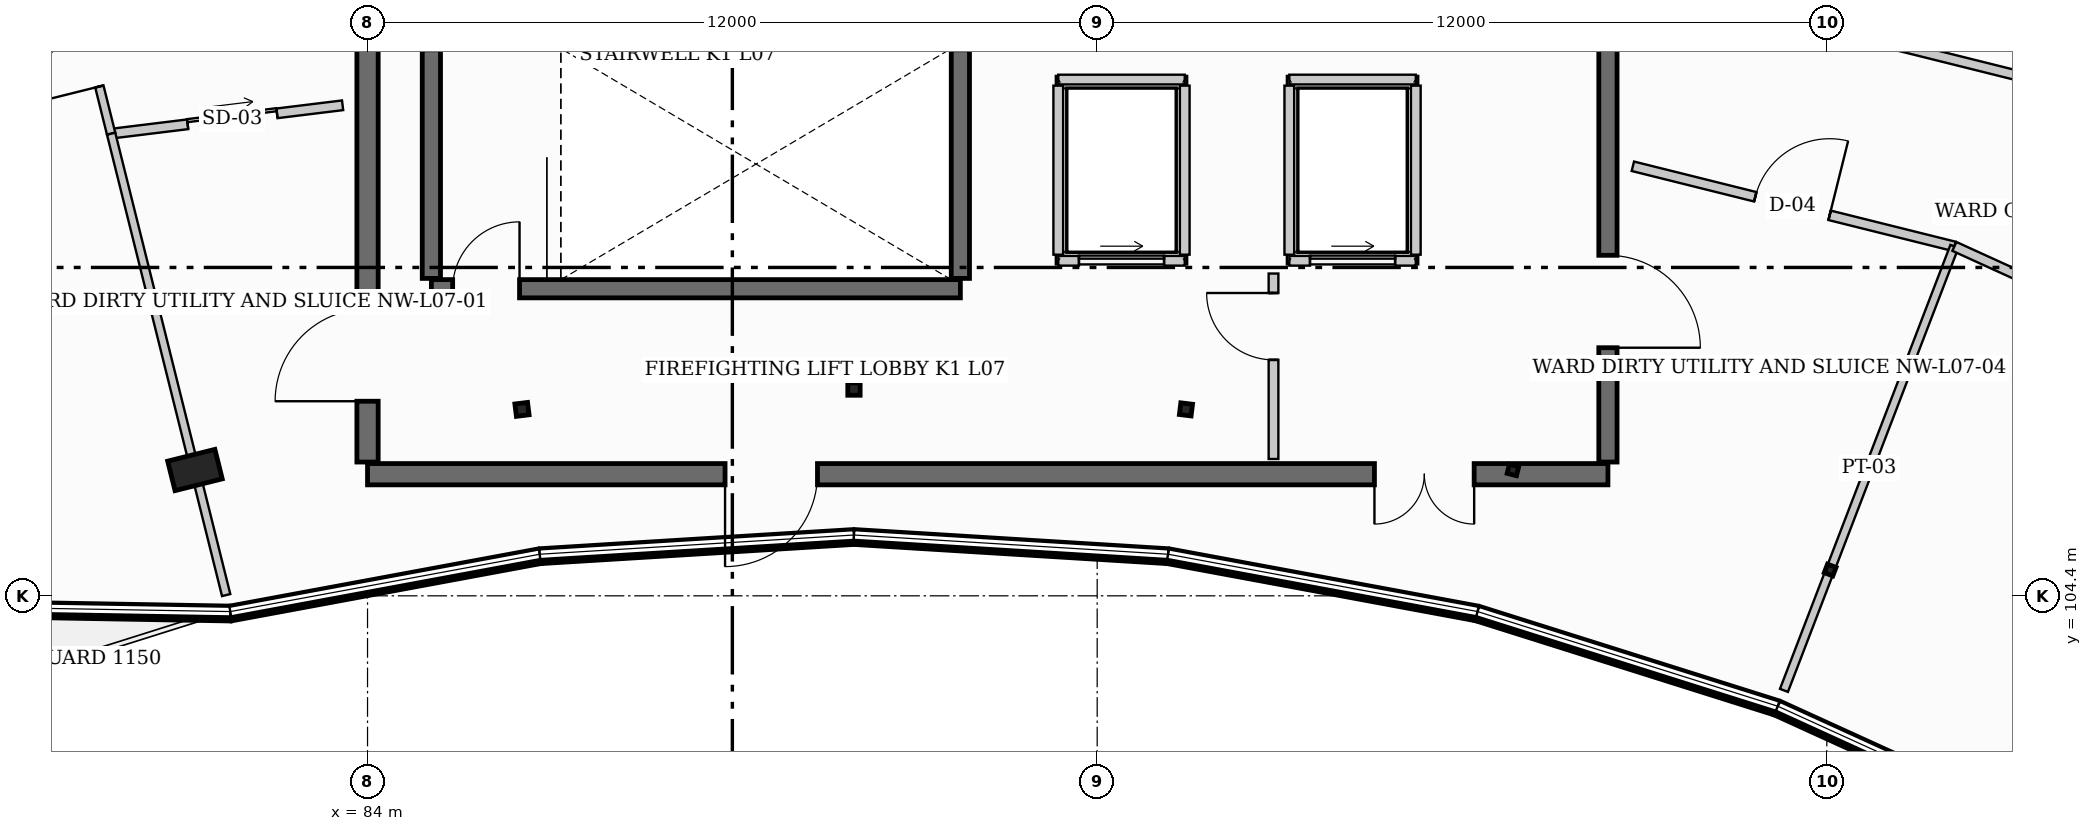
"""IFC4 building model, lengths in metres.
Left out: names, types, materials, properties, quantities, classifications, styles, units other than length and angle.
Written with IfcOpenShell. Run it as: python <this file> out.ifc"""

import sys

from ifc_helpers import new_model, si_unit, direction, frame, frame_2d, origin, origin_2d, place, context, subcontext, project, spatial, rectangle, hollow_rectangle, hollow_circle, i_section, extrude, element, fill, save


model = new_model("IFC4")
c1 = context("Model", 3, precision=1e-05, world=origin(), true_north=direction((0.0, 1.0)))
c2 = subcontext(c1, "Body", "Model", "MODEL_VIEW")
j1 = project(units=[si_unit("LENGTHUNIT", "METRE"), si_unit("PLANEANGLEUNIT", "RADIAN")], contexts=[c1])
p1 = place(None, origin())
s1 = spatial("IfcSite", under=j1, at=p1, CompositionType="ELEMENT")
p2 = place(p1, origin())
s2 = spatial("IfcBuilding", under=s1, at=p2, CompositionType="ELEMENT")
p3 = place(p2, frame((0.0, 0.0, 30.0)))
s3 = spatial("IfcBuildingStorey", under=s2, at=p3, CompositionType="ELEMENT", Elevation=30.0)
p4 = place(p3, frame((81.162, 106.469, 0.0), z_axis=(0.0, 0.0, 1.0), x_axis=(-0.2419218956, 0.970295726276, 0.0)))
e1 = element("IfcColumn", 1, at=p4, inside=s3, PredefinedType="PILASTER", context=c2, shape_type="SweptSolid", body=[
    extrude(rectangle(XDim=0.5, YDim=0.8, at=origin_2d()), origin(), (0.0, 0.0, 1.0), 3.9),
])
p5 = place(p3, frame((86.54, 107.466, 0.0), z_axis=(0.0, 0.0, 1.0), x_axis=(-0.121869343405, 0.992546151641, 0.0)))
e2 = element("IfcColumn", 2, at=p5, inside=s3, PredefinedType="COLUMN", context=c2, shape_type="SweptSolid", body=[
    extrude(i_section(OverallWidth=0.205, OverallDepth=0.21, WebThickness=0.009, FlangeThickness=0.014, at=origin_2d()), origin(), (0.0, 0.0, 1.0), 3.9),
])
p6 = place(p3, frame((92.0, 107.8, 0.0), z_axis=(0.0, 0.0, 1.0), x_axis=(0.0, 1.0, 0.0)))
e3 = element("IfcColumn", 3, at=p6, inside=s3, PredefinedType="COLUMN", context=c2, shape_type="SweptSolid", body=[
    extrude(i_section(OverallWidth=0.203, OverallDepth=0.203, WebThickness=0.007, FlangeThickness=0.011, at=origin_2d()), origin(), (0.0, 0.0, 1.0), 3.9),
])
p7 = place(p3, frame((97.46, 107.466, 0.0), z_axis=(0.0, 0.0, 1.0), x_axis=(0.121869343405, 0.992546151641, 0.0)))
e4 = element("IfcColumn", 4, at=p7, inside=s3, PredefinedType="COLUMN", context=c2, shape_type="SweptSolid", body=[
    extrude(hollow_circle(Radius=0.097, WallThickness=0.008, at=origin_2d()), origin(), (0.0, 0.0, 1.0), 3.9),
])
p8 = place(p3, frame((102.838, 106.469, 0.0), z_axis=(0.0, 0.0, 1.0), x_axis=(0.2419218956, 0.970295726276, 0.0)))
e5 = element("IfcColumn", 5, at=p8, inside=s3, PredefinedType="COLUMN", context=c2, shape_type="SweptSolid", body=[
    extrude(i_section(OverallWidth=0.153, OverallDepth=0.158, WebThickness=0.007, FlangeThickness=0.01, at=origin_2d()), origin(), (0.0, 0.0, 1.0), 3.9),
])
p9 = place(p3, frame((108.055, 104.824, 0.0), z_axis=(0.0, 0.0, 1.0), x_axis=(0.358367949545, 0.933580426497, 0.0)))
e6 = element("IfcColumn", 6, at=p9, inside=s3, PredefinedType="COLUMN", context=c2, shape_type="SweptSolid", body=[
    extrude(hollow_rectangle(XDim=0.15, YDim=0.15, WallThickness=0.008, at=origin_2d()), origin(), (0.0, 0.0, 1.0), 3.9),
])
p10 = place(p3, frame((104.4, 106.4, 0.0), z_axis=(0.0, 0.0, 1.0), x_axis=(-1.0, 0.0, 0.0)))
e7 = element("IfcWall", 7, at=p10, inside=s3, PredefinedType="SHEAR", context=c2, shape_type="SweptSolid", body=[
    extrude(rectangle(XDim=20.4, YDim=0.35, at=frame_2d((10.2, 0.0))), origin(), (0.0, 0.0, 1.0), 3.9),
])
p11 = place(p10, frame((2.2, 0.0, 0.0)))
e8 = element("IfcOpeningElement", 8, at=p11, cuts=e7, PredefinedType="OPENING", context=c2, shape_type="SweptSolid", body=[
    extrude(rectangle(XDim=1.64, YDim=2.2, at=frame_2d((0.82, 1.1))), frame((0.0, 0.185, 0.0), z_axis=(0.0, -1.0, 0.0), x_axis=(1.0, 0.0, 0.0)), (0.0, 0.0, 1.0), 0.37),
])
p12 = place(p10, frame((13.0, 0.0, 0.0)))
e9 = element("IfcOpeningElement", 9, at=p12, cuts=e7, PredefinedType="OPENING", context=c2, shape_type="SweptSolid", body=[
    extrude(rectangle(XDim=1.52, YDim=2.16, at=frame_2d((0.76, 1.08))), frame((0.0, 0.185, 0.0), z_axis=(0.0, -1.0, 0.0), x_axis=(1.0, 0.0, 0.0)), (0.0, 0.0, 1.0), 0.37),
])
p13 = place(p3, frame((84.0, 106.6, 0.0), z_axis=(0.0, 0.0, 1.0), x_axis=(0.0, 1.0, 0.0)))
e10 = element("IfcWall", 10, at=p13, inside=s3, PredefinedType="SHEAR", context=c2, shape_type="SweptSolid", body=[
    extrude(rectangle(XDim=10.6, YDim=0.35, at=frame_2d((5.3, 0.0))), origin(), (0.0, 0.0, 1.0), 3.9),
])
p14 = place(p13, frame((1.0, 0.0, 0.0)))
e11 = element("IfcOpeningElement", 11, at=p14, cuts=e10, PredefinedType="OPENING", context=c2, shape_type="SweptSolid", body=[
    extrude(rectangle(XDim=1.52, YDim=2.16, at=frame_2d((0.76, 1.08))), frame((0.0, 0.185, 0.0), z_axis=(0.0, -1.0, 0.0), x_axis=(1.0, 0.0, 0.0)), (0.0, 0.0, 1.0), 0.37),
])
p15 = place(p3, frame((104.4, 117.2, 0.0), z_axis=(0.0, 0.0, 1.0), x_axis=(0.0, -1.0, 0.0)))
e12 = element("IfcWall", 12, at=p15, inside=s3, PredefinedType="SHEAR", context=c2, shape_type="SweptSolid", body=[
    extrude(rectangle(XDim=10.6, YDim=0.3, at=frame_2d((5.3, 0.0))), origin(), (0.0, 0.0, 1.0), 3.9),
])
p16 = place(p15, frame((7.2, 0.0, 0.0)))
e13 = element("IfcOpeningElement", 13, at=p16, cuts=e12, PredefinedType="OPENING", context=c2, shape_type="SweptSolid", body=[
    extrude(rectangle(XDim=1.52, YDim=2.16, at=frame_2d((0.76, 1.08))), frame((0.0, 0.16, 0.0), z_axis=(0.0, -1.0, 0.0), x_axis=(1.0, 0.0, 0.0)), (0.0, 0.0, 1.0), 0.32),
])
p17 = place(p3, frame((85.05, 109.45, 0.0), z_axis=(0.0, 0.0, 1.0), x_axis=(1.0, 0.0, 0.0)))
e14 = element("IfcWall", 14, at=p17, inside=s3, PredefinedType="SHEAR", context=c2, shape_type="SweptSolid", body=[
    extrude(rectangle(XDim=8.7, YDim=0.3, at=frame_2d((4.35, 0.0))), origin(), (0.0, 0.0, 1.0), 3.9),
])
p18 = place(p17, frame((0.35, 0.0, 0.0)))
e15 = element("IfcOpeningElement", 15, at=p18, cuts=e14, PredefinedType="OPENING", context=c2, shape_type="SweptSolid", body=[
    extrude(rectangle(XDim=1.1, YDim=2.15, at=frame_2d((0.55, 1.075))), frame((0.0, 0.16, 0.0), z_axis=(0.0, -1.0, 0.0), x_axis=(1.0, 0.0, 0.0)), (0.0, 0.0, 1.0), 0.32),
])
for number, where, z_axis, x_axis in (
    (16, (85.05, 109.62, 0.0), (0.0, 0.0, 1.0), (0.0, 1.0, 0.0)),
    (17, (93.75, 109.62, 0.0), (0.0, 0.0, 1.0), (0.0, 1.0, 0.0)),
):
    element("IfcWall", number, at=place(p3, frame(where, z_axis=z_axis, x_axis=x_axis)), inside=s3, PredefinedType="SHEAR", context=c2, shape_type="SweptSolid", body=[
        extrude(rectangle(XDim=3.76, YDim=0.3, at=frame_2d((1.88, 0.0))), origin(), (0.0, 0.0, 1.0), 3.9),
    ])
p19 = place(p3, frame((81.743, 104.141, 0.0), z_axis=(0.0, 0.0, 1.0), x_axis=(-0.999850479392, 0.017292161782, 0.0)))
e18 = element("IfcWall", 18, at=p19, inside=s3, PredefinedType="STANDARD", context=c2, shape_type="SweptSolid", body=[
    extrude(rectangle(XDim=4.97, YDim=0.22, at=frame_2d((2.485, 0.0))), origin(), (0.0, 0.0, 1.0), 1.05),
])
for number, where, z_axis, x_axis in (
    (19, (86.833, 105.084, 0.0), (0.0, 0.0, 1.0), (-0.983, -0.182, 0.0)),
    (20, (92.0, 105.4, 0.0), (0.0, 0.0, 1.0), (-0.998, -0.061, 0.0)),
    (21, (97.167, 105.084, 0.0), (0.0, 0.0, 1.0), (-0.998, 0.061, 0.0)),
    (22, (102.257, 104.141, 0.0), (0.0, 0.0, 1.0), (-0.983, 0.182, 0.0)),
):
    element("IfcWall", number, at=place(p3, frame(where, z_axis=z_axis, x_axis=x_axis)), inside=s3, PredefinedType="STANDARD", context=c2, shape_type="SweptSolid", body=[
        extrude(rectangle(XDim=5.177, YDim=0.22, at=frame_2d((2.588, 0.0))), origin(), (0.0, 0.0, 1.0), 1.05),
    ])
p20 = place(p3, frame((107.195, 102.584, 0.0), z_axis=(0.0, 0.0, 1.0), x_axis=(-0.953706582316, 0.300738681994, 0.0)))
e23 = element("IfcWall", 23, at=p20, inside=s3, PredefinedType="STANDARD", context=c2, shape_type="SweptSolid", body=[
    extrude(rectangle(XDim=5.178, YDim=0.22, at=frame_2d((2.589, 0.0))), origin(), (0.0, 0.0, 1.0), 1.05),
])
p21 = place(p3, frame((111.906, 100.437, 0.0), z_axis=(0.0, 0.0, 1.0), x_axis=(-0.909955822384, 0.414705198074, 0.0)))
e24 = element("IfcWall", 24, at=p21, inside=s3, PredefinedType="STANDARD", context=c2, shape_type="SweptSolid", body=[
    extrude(rectangle(XDim=5.177, YDim=0.22, at=frame_2d((2.588, 0.0))), origin(), (0.0, 0.0, 1.0), 1.05),
])
p22 = place(p3, frame((95.36, 109.91, 0.0), z_axis=(0.0, 0.0, 1.0), x_axis=(1.0, 0.0, 0.0)))
e25 = element("IfcWall", 25, at=p22, inside=s3, PredefinedType="PARTITIONING", context=c2, shape_type="SweptSolid", body=[
    extrude(rectangle(XDim=2.08, YDim=0.16, at=frame_2d((1.04, 0.0))), origin(), (0.0, 0.0, 1.0), 3.57),
])
p23 = place(p22, frame((0.34, 0.0, 0.0)))
e26 = element("IfcOpeningElement", 26, at=p23, cuts=e25, PredefinedType="OPENING", context=c2, shape_type="SweptSolid", body=[
    extrude(rectangle(XDim=1.4, YDim=2.2, at=frame_2d((0.7, 1.1))), frame((0.0, 0.09, 0.0), z_axis=(0.0, -1.0, 0.0), x_axis=(1.0, 0.0, 0.0)), (0.0, 0.0, 1.0), 0.18),
])
p24 = place(p3, frame((97.44, 112.89, 0.0), z_axis=(0.0, 0.0, 1.0), x_axis=(-1.0, 0.0, 0.0)))
e27 = element("IfcWall", 27, at=p24, inside=s3, PredefinedType="PARTITIONING", context=c2, shape_type="SweptSolid", body=[
    extrude(rectangle(XDim=2.08, YDim=0.16, at=frame_2d((1.04, 0.0))), origin(), (0.0, 0.0, 1.0), 3.57),
])
for number, where, z_axis, x_axis in (
    (28, (95.36, 112.79, 0.0), (0.0, 0.0, 1.0), (0.0, -1.0, 0.0)),
    (29, (97.44, 110.01, 0.0), (0.0, 0.0, 1.0), (0.0, 1.0, 0.0)),
):
    element("IfcWall", number, at=place(p3, frame(where, z_axis=z_axis, x_axis=x_axis)), inside=s3, PredefinedType="PARTITIONING", context=c2, shape_type="SweptSolid", body=[
        extrude(rectangle(XDim=2.78, YDim=0.16, at=frame_2d((1.39, 0.0))), origin(), (0.0, 0.0, 1.0), 3.57),
    ])
p25 = place(p3, frame((99.16, 109.91, 0.0), z_axis=(0.0, 0.0, 1.0), x_axis=(1.0, 0.0, 0.0)))
e30 = element("IfcWall", 30, at=p25, inside=s3, PredefinedType="PARTITIONING", context=c2, shape_type="SweptSolid", body=[
    extrude(rectangle(XDim=2.08, YDim=0.16, at=frame_2d((1.04, 0.0))), origin(), (0.0, 0.0, 1.0), 3.57),
])
p26 = place(p25, frame((0.34, 0.0, 0.0)))
e31 = element("IfcOpeningElement", 31, at=p26, cuts=e30, PredefinedType="OPENING", context=c2, shape_type="SweptSolid", body=[
    extrude(rectangle(XDim=1.4, YDim=2.2, at=frame_2d((0.7, 1.1))), frame((0.0, 0.09, 0.0), z_axis=(0.0, -1.0, 0.0), x_axis=(1.0, 0.0, 0.0)), (0.0, 0.0, 1.0), 0.18),
])
p27 = place(p3, frame((101.24, 112.89, 0.0), z_axis=(0.0, 0.0, 1.0), x_axis=(-1.0, 0.0, 0.0)))
e32 = element("IfcWall", 32, at=p27, inside=s3, PredefinedType="PARTITIONING", context=c2, shape_type="SweptSolid", body=[
    extrude(rectangle(XDim=2.08, YDim=0.16, at=frame_2d((1.04, 0.0))), origin(), (0.0, 0.0, 1.0), 3.57),
])
for number, where, z_axis, x_axis in (
    (33, (99.16, 112.79, 0.0), (0.0, 0.0, 1.0), (0.0, -1.0, 0.0)),
    (34, (101.24, 110.01, 0.0), (0.0, 0.0, 1.0), (0.0, 1.0, 0.0)),
):
    element("IfcWall", number, at=place(p3, frame(where, z_axis=z_axis, x_axis=x_axis)), inside=s3, PredefinedType="PARTITIONING", context=c2, shape_type="SweptSolid", body=[
        extrude(rectangle(XDim=2.78, YDim=0.16, at=frame_2d((1.39, 0.0))), origin(), (0.0, 0.0, 1.0), 3.57),
    ])
p28 = place(p3, frame((98.9, 106.65, 0.0), z_axis=(0.0, 0.0, 1.0), x_axis=(0.0, 1.0, 0.0)))
e35 = element("IfcWall", 35, at=p28, inside=s3, PredefinedType="PARTITIONING", context=c2, shape_type="SweptSolid", body=[
    extrude(rectangle(XDim=3.05, YDim=0.16, at=frame_2d((1.525, 0.0))), origin(), (0.0, 0.0, 1.0), 3.57),
])
p29 = place(p28, frame((1.63, 0.0, 0.0)))
e36 = element("IfcOpeningElement", 36, at=p29, cuts=e35, PredefinedType="OPENING", context=c2, shape_type="SweptSolid", body=[
    extrude(rectangle(XDim=1.1, YDim=2.15, at=frame_2d((0.55, 1.075))), frame((0.0, 0.09, 0.0), z_axis=(0.0, -1.0, 0.0), x_axis=(1.0, 0.0, 0.0)), (0.0, 0.0, 1.0), 0.18),
])
p30 = place(p3, frame((79.783, 112.0, 0.0), z_axis=(0.0, 0.0, 1.0), x_axis=(0.992559253302, 0.121762591482, 0.0)))
e37 = element("IfcWall", 37, at=p30, inside=s3, PredefinedType="PARTITIONING", context=c2, shape_type="SweptSolid", body=[
    extrude(rectangle(XDim=3.836, YDim=0.16, at=frame_2d((1.918, 0.0))), origin(), (0.0, 0.0, 1.0), 3.278),
])
p31 = place(p30, frame((1.268, 0.0, 0.0)))
e38 = element("IfcOpeningElement", 38, at=p31, cuts=e37, PredefinedType="OPENING", context=c2, shape_type="SweptSolid", body=[
    extrude(rectangle(XDim=1.48, YDim=2.26, at=frame_2d((0.74, 1.13))), frame((0.0, 0.09, 0.0), z_axis=(0.0, -1.0, 0.0), x_axis=(1.0, 0.0, 0.0)), (0.0, 0.0, 1.0), 0.18),
])
p32 = place(p3, frame((104.81, 114.533, 0.0), z_axis=(0.0, 0.0, 1.0), x_axis=(0.970315261497, -0.241843530625, 0.0)))
e39 = element("IfcWall", 39, at=p32, inside=s3, PredefinedType="PARTITIONING", context=c2, shape_type="SweptSolid", body=[
    extrude(rectangle(XDim=6.558, YDim=0.16, at=frame_2d((3.279, 0.0))), origin(), (0.0, 0.0, 1.0), 3.425),
])
p33 = place(p32, frame((2.629, 0.0, 0.0)))
e40 = element("IfcOpeningElement", 40, at=p33, cuts=e39, PredefinedType="OPENING", context=c2, shape_type="SweptSolid", body=[
    extrude(rectangle(XDim=1.36, YDim=2.18, at=frame_2d((0.68, 1.09))), frame((0.0, 0.09, 0.0), z_axis=(0.0, -1.0, 0.0), x_axis=(1.0, 0.0, 0.0)), (0.0, 0.0, 1.0), 0.18),
])
p34 = place(p3, frame((104.81, 111.464, 0.0), z_axis=(0.0, 0.0, 1.0), x_axis=(0.970308293834, -0.241871484298, 0.0)))
e41 = element("IfcWall", 41, at=p34, inside=s3, PredefinedType="PARTITIONING", context=c2, shape_type="SweptSolid", body=[
    extrude(rectangle(XDim=5.45, YDim=0.16, at=frame_2d((2.725, 0.0))), origin(), (0.0, 0.0, 1.0), 3.428),
])
p35 = place(p34, frame((2.075, 0.0, 0.0)))
e42 = element("IfcOpeningElement", 42, at=p35, cuts=e41, PredefinedType="OPENING", context=c2, shape_type="SweptSolid", body=[
    extrude(rectangle(XDim=1.26, YDim=2.14, at=frame_2d((0.63, 1.07))), frame((0.0, 0.09, 0.0), z_axis=(0.0, -1.0, 0.0), x_axis=(1.0, 0.0, 0.0)), (0.0, 0.0, 1.0), 0.18),
])
p36 = place(p3, frame((110.098, 110.146, 0.0), z_axis=(0.0, 0.0, 1.0), x_axis=(-0.358410014332, -0.933564278251, 0.0)))
e43 = element("IfcWall", 43, at=p36, inside=s3, PredefinedType="PARTITIONING", context=c2, shape_type="SweptSolid", body=[
    extrude(rectangle(XDim=7.821, YDim=0.14, at=frame_2d((3.91, 0.0))), origin(), (0.0, 0.0, 1.0), 3.428),
])
p37 = place(p3, frame((110.098, 110.146, 0.0), z_axis=(0.0, 0.0, 1.0), x_axis=(0.909942329762, -0.414734802623, 0.0)))
e44 = element("IfcWall", 44, at=p37, inside=s3, PredefinedType="PARTITIONING", context=c2, shape_type="SweptSolid", body=[
    extrude(rectangle(XDim=4.065, YDim=0.16, at=frame_2d((2.033, 0.0))), origin(), (0.0, 0.0, 1.0), 3.428),
])
p38 = place(p37, frame((1.383, 0.0, 0.0)))
e45 = element("IfcOpeningElement", 45, at=p38, cuts=e44, PredefinedType="OPENING", context=c2, shape_type="SweptSolid", body=[
    extrude(rectangle(XDim=1.06, YDim=2.1, at=frame_2d((0.53, 1.05))), frame((0.0, 0.09, 0.0), z_axis=(0.0, -1.0, 0.0), x_axis=(1.0, 0.0, 0.0)), (0.0, 0.0, 1.0), 0.18),
])
p39 = place(p3, frame((79.783, 112.0, 0.0), z_axis=(0.0, 0.0, 1.0), x_axis=(-0.242018600037, 0.970271610033, 0.0)))
e46 = element("IfcWall", 46, at=p39, inside=s3, PredefinedType="PARTITIONING", context=c2, shape_type="SweptSolid", body=[
    extrude(rectangle(XDim=3.0, YDim=0.14, at=frame_2d((1.5, 0.0))), origin(), (0.0, 0.0, 1.0), 3.278),
])
p40 = place(p39, frame((0.8, 0.0, 0.0)))
e47 = element("IfcOpeningElement", 47, at=p40, cuts=e46, PredefinedType="OPENING", context=c2, shape_type="SweptSolid", body=[
    extrude(rectangle(XDim=0.96, YDim=2.06, at=frame_2d((0.48, 1.03))), frame((0.0, 0.08, 0.0), z_axis=(0.0, -1.0, 0.0), x_axis=(1.0, 0.0, 0.0)), (0.0, 0.0, 1.0), 0.16),
])
p41 = place(p3, frame((81.675, 104.412, 0.0), z_axis=(0.0, 0.0, 1.0), x_axis=(-0.241947927131, 0.970289235515, 0.0)))
e48 = element("IfcWall", 48, at=p41, inside=s3, PredefinedType="PARTITIONING", context=c2, shape_type="SweptSolid", body=[
    extrude(rectangle(XDim=7.82, YDim=0.14, at=frame_2d((3.91, 0.0))), origin(), (0.0, 0.0, 1.0), 3.278),
])
p42 = place(p23, origin())
e49 = element("IfcDoor", 49, at=p42, inside=s3, OperationType="SLIDING_TO_LEFT", PredefinedType="DOOR", context=c2, shape_type="SweptSolid", body=[
    extrude(rectangle(XDim=1.4, YDim=2.2, at=frame_2d((0.7, 1.1))), frame((0.0, 0.025, 0.0), z_axis=(0.0, -1.0, 0.0), x_axis=(1.0, 0.0, 0.0)), (0.0, 0.0, 1.0), 0.05),
])
fill(e26, e49)
p43 = place(p26, origin())
e50 = element("IfcDoor", 50, at=p43, inside=s3, OperationType="SLIDING_TO_LEFT", PredefinedType="DOOR", context=c2, shape_type="SweptSolid", body=[
    extrude(rectangle(XDim=1.4, YDim=2.2, at=frame_2d((0.7, 1.1))), frame((0.0, 0.025, 0.0), z_axis=(0.0, -1.0, 0.0), x_axis=(1.0, 0.0, 0.0)), (0.0, 0.0, 1.0), 0.05),
])
fill(e31, e50)
p44 = place(p18, origin())
e51 = element("IfcDoor", 51, at=p44, inside=s3, OperationType="SINGLE_SWING_RIGHT", PredefinedType="DOOR", context=c2, shape_type="SweptSolid", body=[
    extrude(rectangle(XDim=1.1, YDim=2.15, at=frame_2d((0.55, 1.075))), frame((0.0, 0.025, 0.0), z_axis=(0.0, -1.0, 0.0), x_axis=(1.0, 0.0, 0.0)), (0.0, 0.0, 1.0), 0.05),
])
fill(e15, e51)
p45 = place(p11, origin())
e52 = element("IfcDoor", 52, at=p45, inside=s3, OperationType="DOUBLE_DOOR_SINGLE_SWING", PredefinedType="DOOR", context=c2, shape_type="SweptSolid", body=[
    extrude(rectangle(XDim=1.64, YDim=2.2, at=frame_2d((0.82, 1.1))), frame((0.0, 0.025, 0.0), z_axis=(0.0, -1.0, 0.0), x_axis=(1.0, 0.0, 0.0)), (0.0, 0.0, 1.0), 0.05),
])
fill(e8, e52)
p46 = place(p12, origin())
e53 = element("IfcDoor", 53, at=p46, inside=s3, OperationType="SINGLE_SWING_RIGHT", PredefinedType="DOOR", context=c2, shape_type="SweptSolid", body=[
    extrude(rectangle(XDim=1.52, YDim=2.16, at=frame_2d((0.76, 1.08))), frame((0.0, 0.025, 0.0), z_axis=(0.0, -1.0, 0.0), x_axis=(1.0, 0.0, 0.0)), (0.0, 0.0, 1.0), 0.05),
])
fill(e9, e53)
p47 = place(p14, origin())
e54 = element("IfcDoor", 54, at=p47, inside=s3, OperationType="SINGLE_SWING_LEFT", PredefinedType="DOOR", context=c2, shape_type="SweptSolid", body=[
    extrude(rectangle(XDim=1.52, YDim=2.16, at=frame_2d((0.76, 1.08))), frame((0.0, 0.025, 0.0), z_axis=(0.0, -1.0, 0.0), x_axis=(1.0, 0.0, 0.0)), (0.0, 0.0, 1.0), 0.05),
])
fill(e11, e54)
p48 = place(p16, origin())
e55 = element("IfcDoor", 55, at=p48, inside=s3, OperationType="SINGLE_SWING_RIGHT", PredefinedType="DOOR", context=c2, shape_type="SweptSolid", body=[
    extrude(rectangle(XDim=1.52, YDim=2.16, at=frame_2d((0.76, 1.08))), frame((0.0, 0.025, 0.0), z_axis=(0.0, -1.0, 0.0), x_axis=(1.0, 0.0, 0.0)), (0.0, 0.0, 1.0), 0.05),
])
fill(e13, e55)
p49 = place(p29, origin())
e56 = element("IfcDoor", 56, at=p49, inside=s3, OperationType="SINGLE_SWING_RIGHT", PredefinedType="DOOR", context=c2, shape_type="SweptSolid", body=[
    extrude(rectangle(XDim=1.1, YDim=2.15, at=frame_2d((0.55, 1.075))), frame((0.0, 0.025, 0.0), z_axis=(0.0, -1.0, 0.0), x_axis=(1.0, 0.0, 0.0)), (0.0, 0.0, 1.0), 0.05),
])
fill(e36, e56)
p50 = place(p31, origin())
e57 = element("IfcDoor", 57, at=p50, inside=s3, OperationType="SLIDING_TO_LEFT", PredefinedType="DOOR", context=c2, shape_type="SweptSolid", body=[
    extrude(rectangle(XDim=1.48, YDim=2.26, at=frame_2d((0.74, 1.13))), frame((0.0, 0.025, 0.0), z_axis=(0.0, -1.0, 0.0), x_axis=(1.0, 0.0, 0.0)), (0.0, 0.0, 1.0), 0.05),
])
fill(e38, e57)
p51 = place(p35, origin())
e58 = element("IfcDoor", 58, at=p51, inside=s3, OperationType="SINGLE_SWING_RIGHT", PredefinedType="DOOR", context=c2, shape_type="SweptSolid", body=[
    extrude(rectangle(XDim=1.26, YDim=2.14, at=frame_2d((0.63, 1.07))), frame((0.0, 0.025, 0.0), z_axis=(0.0, -1.0, 0.0), x_axis=(1.0, 0.0, 0.0)), (0.0, 0.0, 1.0), 0.05),
])
fill(e42, e58)
p52 = place(p40, origin())
e59 = element("IfcDoor", 59, at=p52, inside=s3, OperationType="SINGLE_SWING_LEFT", PredefinedType="DOOR", context=c2, shape_type="SweptSolid", body=[
    extrude(rectangle(XDim=0.96, YDim=2.06, at=frame_2d((0.48, 1.03))), frame((0.0, 0.025, 0.0), z_axis=(0.0, -1.0, 0.0), x_axis=(1.0, 0.0, 0.0)), (0.0, 0.0, 1.0), 0.05),
])
fill(e47, e59)
save(model, sys.argv[1])
